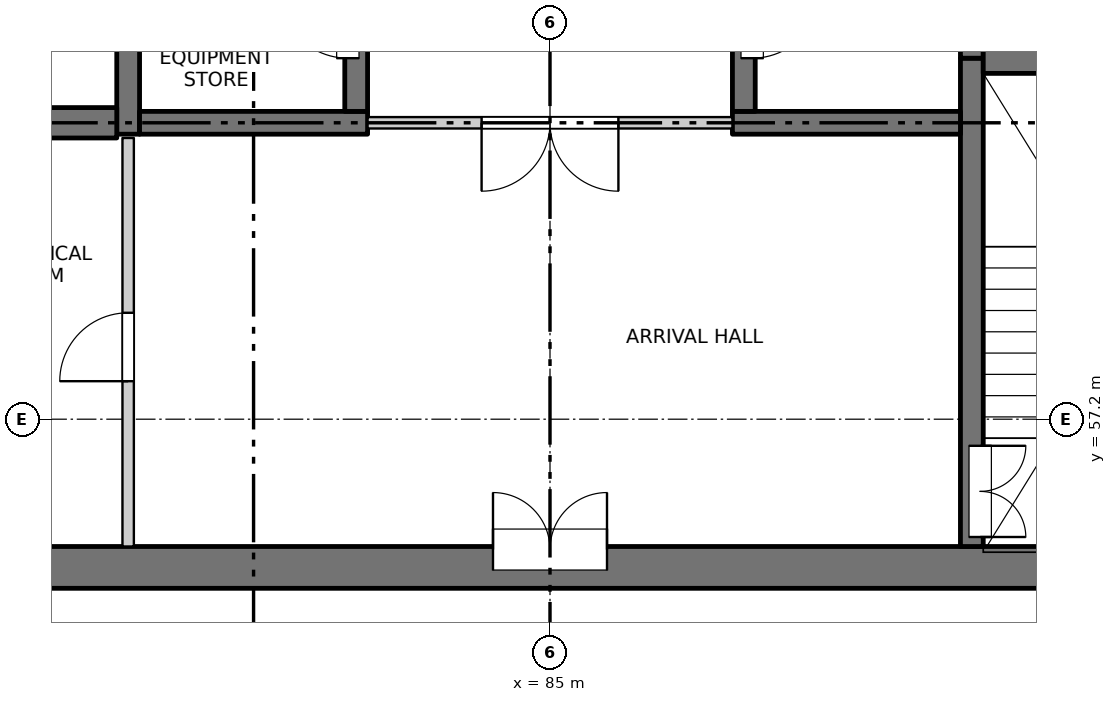
"""IFC4 building model, lengths in metres.
Left out: names, types, materials, properties, quantities, classifications, styles, units other than length and angle.
Written with IfcOpenShell. Run it as: python <this file> out.ifc"""

import sys

from ifc_helpers import new_model, si_unit, direction, frame, frame_2d, origin, place, context, subcontext, project, spatial, rectangle, extrude, element, fill, save


model = new_model("IFC4")
c1 = context("Model", 3, precision=1e-05, world=origin(), true_north=direction((0.0, 1.0)))
c2 = subcontext(c1, "Body", "Model", "MODEL_VIEW")
j1 = project(units=[si_unit("LENGTHUNIT", "METRE"), si_unit("PLANEANGLEUNIT", "RADIAN")], contexts=[c1])
p1 = place(None, origin())
s1 = spatial("IfcSite", under=j1, at=p1, CompositionType="ELEMENT")
p2 = place(p1, origin())
s2 = spatial("IfcBuilding", under=s1, at=p2, CompositionType="ELEMENT")
p3 = place(p2, frame((0.0, 0.0, 179.2)))
s3 = spatial("IfcBuildingStorey", under=s2, at=p3, CompositionType="ELEMENT", Elevation=179.2)
p4 = place(p3, frame((75.525, 55.25, -0.3), z_axis=(0.0, 0.0, 1.0), x_axis=(1.0, 0.0, 0.0)))
e1 = element("IfcWall", 1, at=p4, inside=s3, PredefinedType="SOLIDWALL", context=c2, shape_type="SweptSolid", body=[
    extrude(rectangle(XDim=18.95, YDim=0.55, at=frame_2d((9.475, 0.0))), origin(), (0.0, 0.0, 1.0), 3.45),
])
p5 = place(p4, frame((8.725, 0.0, 0.3)))
e2 = element("IfcOpeningElement", 2, at=p5, cuts=e1, PredefinedType="OPENING", context=c2, shape_type="SweptSolid", body=[
    extrude(rectangle(XDim=1.5, YDim=2.1, at=frame_2d((0.75, 1.05))), frame((0.0, 0.285, 0.0), z_axis=(0.0, -1.0, 0.0), x_axis=(1.0, 0.0, 0.0)), (0.0, 0.0, 1.0), 0.57),
])
p6 = place(p3, frame((79.45, 60.95, -0.3), z_axis=(0.0, 0.0, 1.0), x_axis=(0.0, 1.0, 0.0)))
e3 = element("IfcWall", 3, at=p6, inside=s3, PredefinedType="SOLIDWALL", context=c2, shape_type="SweptSolid", body=[
    extrude(rectangle(XDim=16.35, YDim=0.3, at=frame_2d((8.175, 0.0))), origin(), (0.0, 0.0, 1.0), 3.45),
])
p7 = place(p3, frame((90.55, 55.525, -0.3), z_axis=(0.0, 0.0, 1.0), x_axis=(0.0, 1.0, 0.0)))
e4 = element("IfcWall", 4, at=p7, inside=s3, PredefinedType="SOLIDWALL", context=c2, shape_type="SweptSolid", body=[
    extrude(rectangle(XDim=6.425, YDim=0.3, at=frame_2d((3.212, 0.0))), origin(), (0.0, 0.0, 1.0), 3.45),
])
p8 = place(p7, frame((0.125, 0.0, 0.3)))
e5 = element("IfcOpeningElement", 5, at=p8, cuts=e4, PredefinedType="OPENING", context=c2, shape_type="SweptSolid", body=[
    extrude(rectangle(XDim=1.2, YDim=2.1, at=frame_2d((0.6, 1.05))), frame((0.0, 0.16, 0.0), z_axis=(0.0, -1.0, 0.0), x_axis=(1.0, 0.0, 0.0)), (0.0, 0.0, 1.0), 0.32),
])
p9 = place(p3, frame((90.55, 61.95, -0.3), z_axis=(0.0, 0.0, 1.0), x_axis=(0.0, 1.0, 0.0)))
e6 = element("IfcWall", 6, at=p9, inside=s3, PredefinedType="SOLIDWALL", context=c2, shape_type="SweptSolid", body=[
    extrude(rectangle(XDim=15.35, YDim=0.3, at=frame_2d((7.675, 0.0))), origin(), (0.0, 0.0, 1.0), 3.45),
])
p10 = place(p3, frame((79.6, 61.1, -0.3), z_axis=(0.0, 0.0, 1.0), x_axis=(1.0, 0.0, 0.0)))
e7 = element("IfcWall", 7, at=p10, inside=s3, PredefinedType="SOLIDWALL", context=c2, shape_type="SweptSolid", body=[
    extrude(rectangle(XDim=3.0, YDim=0.3, at=frame_2d((1.5, 0.0))), origin(), (0.0, 0.0, 1.0), 3.45),
])
p11 = place(p3, frame((82.45, 61.25, -0.3), z_axis=(0.0, 0.0, 1.0), x_axis=(0.0, 1.0, 0.0)))
e8 = element("IfcWall", 8, at=p11, inside=s3, PredefinedType="SOLIDWALL", context=c2, shape_type="SweptSolid", body=[
    extrude(rectangle(XDim=2.3, YDim=0.3, at=frame_2d((1.15, 0.0))), origin(), (0.0, 0.0, 1.0), 3.45),
])
p12 = place(p11, frame((0.7, 0.0, 0.3)))
e9 = element("IfcOpeningElement", 9, at=p12, cuts=e8, PredefinedType="OPENING", context=c2, shape_type="SweptSolid", body=[
    extrude(rectangle(XDim=0.9, YDim=2.1, at=frame_2d((0.45, 1.05))), frame((0.0, 0.16, 0.0), z_axis=(0.0, -1.0, 0.0), x_axis=(1.0, 0.0, 0.0)), (0.0, 0.0, 1.0), 0.32),
])
p13 = place(p3, frame((87.4, 61.1, -0.3), z_axis=(0.0, 0.0, 1.0), x_axis=(1.0, 0.0, 0.0)))
e10 = element("IfcWall", 10, at=p13, inside=s3, PredefinedType="SOLIDWALL", context=c2, shape_type="SweptSolid", body=[
    extrude(rectangle(XDim=3.0, YDim=0.3, at=frame_2d((1.5, 0.0))), origin(), (0.0, 0.0, 1.0), 3.45),
])
p14 = place(p3, frame((87.55, 61.25, -0.3), z_axis=(0.0, 0.0, 1.0), x_axis=(0.0, 1.0, 0.0)))
e11 = element("IfcWall", 11, at=p14, inside=s3, PredefinedType="SOLIDWALL", context=c2, shape_type="SweptSolid", body=[
    extrude(rectangle(XDim=2.3, YDim=0.3, at=frame_2d((1.15, 0.0))), origin(), (0.0, 0.0, 1.0), 3.45),
])
p15 = place(p14, frame((0.7, 0.0, 0.3)))
e12 = element("IfcOpeningElement", 12, at=p15, cuts=e11, PredefinedType="OPENING", context=c2, shape_type="SweptSolid", body=[
    extrude(rectangle(XDim=0.9, YDim=2.1, at=frame_2d((0.45, 1.05))), frame((0.0, 0.16, 0.0), z_axis=(0.0, -1.0, 0.0), x_axis=(1.0, 0.0, 0.0)), (0.0, 0.0, 1.0), 0.32),
])
for number, where, z_axis, x_axis in (
    (13, (75.525, 61.1, -0.3), (0.0, 0.0, 1.0), (1.0, 0.0, 0.0)),
    (14, (90.7, 61.95, -0.3), (0.0, 0.0, 1.0), (1.0, 0.0, 0.0)),
):
    element("IfcWall", number, at=place(p3, frame(where, z_axis=z_axis, x_axis=x_axis)), inside=s3, PredefinedType="SOLIDWALL", context=c2, shape_type="SweptSolid", body=[
        extrude(rectangle(XDim=3.775, YDim=0.4, at=frame_2d((1.888, 0.0))), origin(), (0.0, 0.0, 1.0), 3.45),
    ])
p16 = place(p3, frame((82.6, 61.1, 0.0), z_axis=(0.0, 0.0, 1.0), x_axis=(1.0, 0.0, 0.0)))
e15 = element("IfcWall", 15, at=p16, inside=s3, PredefinedType="PARTITIONING", context=c2, shape_type="SweptSolid", body=[
    extrude(rectangle(XDim=4.8, YDim=0.15, at=frame_2d((2.4, 0.0))), origin(), (0.0, 0.0, 1.0), 3.15),
])
p17 = place(p16, frame((1.5, 0.0, 0.0)))
e16 = element("IfcOpeningElement", 16, at=p17, cuts=e15, PredefinedType="OPENING", context=c2, shape_type="SweptSolid", body=[
    extrude(rectangle(XDim=1.8, YDim=2.1, at=frame_2d((0.9, 1.05))), frame((0.0, 0.085, 0.0), z_axis=(0.0, -1.0, 0.0), x_axis=(1.0, 0.0, 0.0)), (0.0, 0.0, 1.0), 0.17),
])
p18 = place(p3, frame((79.45, 55.525, 0.0), z_axis=(0.0, 0.0, 1.0), x_axis=(0.0, 1.0, 0.0)))
e17 = element("IfcWall", 17, at=p18, inside=s3, PredefinedType="PARTITIONING", context=c2, shape_type="SweptSolid", body=[
    extrude(rectangle(XDim=5.375, YDim=0.15, at=frame_2d((2.688, 0.0))), origin(), (0.0, 0.0, 1.0), 3.15),
])
p19 = place(p18, frame((2.175, 0.0, 0.0)))
e18 = element("IfcOpeningElement", 18, at=p19, cuts=e17, PredefinedType="OPENING", context=c2, shape_type="SweptSolid", body=[
    extrude(rectangle(XDim=0.9, YDim=2.1, at=frame_2d((0.45, 1.05))), frame((0.0, 0.085, 0.0), z_axis=(0.0, -1.0, 0.0), x_axis=(1.0, 0.0, 0.0)), (0.0, 0.0, 1.0), 0.17),
])
p20 = place(p5, origin())
e19 = element("IfcDoor", 19, at=p20, inside=s3, OperationType="DOUBLE_DOOR_SINGLE_SWING", PredefinedType="DOOR", context=c2, shape_type="SweptSolid", body=[
    extrude(rectangle(XDim=1.5, YDim=2.1, at=frame_2d((0.75, 1.05))), frame((0.0, 0.26, 0.0), z_axis=(0.0, -1.0, 0.0), x_axis=(1.0, 0.0, 0.0)), (0.0, 0.0, 1.0), 0.05),
])
fill(e2, e19)
p21 = place(p8, origin())
e20 = element("IfcDoor", 20, at=p21, inside=s3, OperationType="DOUBLE_DOOR_SINGLE_SWING", PredefinedType="DOOR", context=c2, shape_type="SweptSolid", body=[
    extrude(rectangle(XDim=1.2, YDim=2.1, at=frame_2d((0.6, 1.05))), frame((0.0, -0.085, 0.0), z_axis=(0.0, -1.0, 0.0), x_axis=(1.0, 0.0, 0.0)), (0.0, 0.0, 1.0), 0.05),
])
fill(e5, e20)
p22 = place(p19, origin())
e21 = element("IfcDoor", 21, at=p22, inside=s3, OperationType="SINGLE_SWING_LEFT", PredefinedType="DOOR", context=c2, shape_type="SweptSolid", body=[
    extrude(rectangle(XDim=0.9, YDim=2.1, at=frame_2d((0.45, 1.05))), frame((0.0, 0.025, 0.0), z_axis=(0.0, -1.0, 0.0), x_axis=(1.0, 0.0, 0.0)), (0.0, 0.0, 1.0), 0.05),
])
fill(e18, e21)
p23 = place(p17, origin())
e22 = element("IfcDoor", 22, at=p23, inside=s3, OperationType="DOUBLE_DOOR_SINGLE_SWING", PredefinedType="DOOR", context=c2, shape_type="SweptSolid", body=[
    extrude(rectangle(XDim=1.8, YDim=2.1, at=frame_2d((0.9, 1.05))), frame((0.0, 0.025, 0.0), z_axis=(0.0, -1.0, 0.0), x_axis=(1.0, 0.0, 0.0)), (0.0, 0.0, 1.0), 0.05),
])
fill(e16, e22)
p24 = place(p12, origin())
e23 = element("IfcDoor", 23, at=p24, inside=s3, OperationType="SINGLE_SWING_RIGHT", PredefinedType="DOOR", context=c2, shape_type="SweptSolid", body=[
    extrude(rectangle(XDim=0.9, YDim=2.1, at=frame_2d((0.45, 1.05))), frame((0.0, 0.135, 0.0), z_axis=(0.0, -1.0, 0.0), x_axis=(1.0, 0.0, 0.0)), (0.0, 0.0, 1.0), 0.05),
])
fill(e9, e23)
p25 = place(p15, origin())
e24 = element("IfcDoor", 24, at=p25, inside=s3, OperationType="SINGLE_SWING_LEFT", PredefinedType="DOOR", context=c2, shape_type="SweptSolid", body=[
    extrude(rectangle(XDim=0.9, YDim=2.1, at=frame_2d((0.45, 1.05))), frame((0.0, -0.085, 0.0), z_axis=(0.0, -1.0, 0.0), x_axis=(1.0, 0.0, 0.0)), (0.0, 0.0, 1.0), 0.05),
])
fill(e12, e24)
save(model, sys.argv[1])
